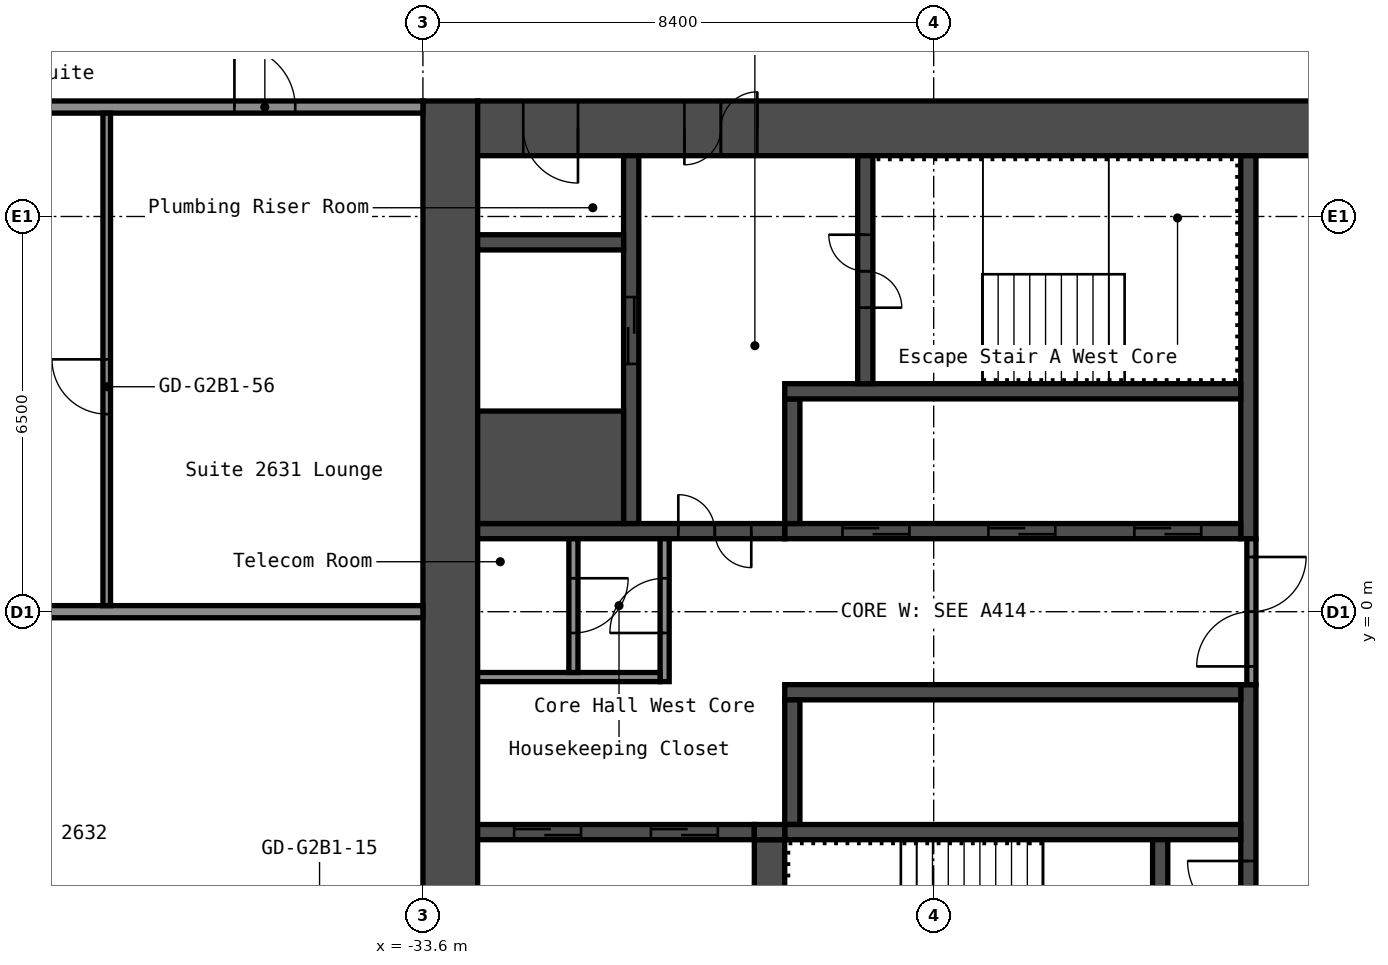
"""IFC4 building model, lengths in metres.
Left out: names, types, materials, properties, quantities, classifications, styles, units other than length and angle.
Written with IfcOpenShell. Run it as: python <this file> out.ifc"""

import sys

from ifc_helpers import new_model, si_unit, direction, frame, frame_2d, origin, place, context, subcontext, project, spatial, rectangle, extrude, element, fill, save


model = new_model("IFC4")
c1 = context("Model", 3, precision=1e-05, world=origin(), true_north=direction((0.0, 1.0)))
c2 = subcontext(c1, "Body", "Model", "MODEL_VIEW")
j1 = project(units=[si_unit("LENGTHUNIT", "METRE"), si_unit("PLANEANGLEUNIT", "RADIAN")], contexts=[c1])
p1 = place(None, origin())
s1 = spatial("IfcSite", under=j1, at=p1, CompositionType="ELEMENT")
p2 = place(p1, origin())
s2 = spatial("IfcBuilding", under=s1, at=p2, CompositionType="ELEMENT")
p3 = place(p2, frame((0.0, 0.0, 94.6)))
s3 = spatial("IfcBuildingStorey", under=s2, at=p3, CompositionType="ELEMENT", Elevation=94.6)
p4 = place(p3, frame((-33.15, -8.4, 0.0), z_axis=(0.0, 0.0, 1.0), x_axis=(0.0, 1.0, 0.0)))
e1 = element("IfcWall", 1, at=p4, inside=s3, PredefinedType="SHEAR", context=c2, shape_type="SweptSolid", body=[
    extrude(rectangle(XDim=16.8, YDim=0.9, at=frame_2d((8.4, 0.0))), origin(), (0.0, 0.0, 1.0), 2.8),
])
p5 = place(p3, frame((-32.7, 7.95, 0.0), z_axis=(0.0, 0.0, 1.0), x_axis=(1.0, 0.0, 0.0)))
e2 = element("IfcWall", 2, at=p5, inside=s3, PredefinedType="SHEAR", context=c2, shape_type="SweptSolid", body=[
    extrude(rectangle(XDim=15.0, YDim=0.9, at=frame_2d((7.5, 0.0))), origin(), (0.0, 0.0, 1.0), 2.8),
])
p6 = place(p5, frame((3.4, 0.0, 0.0)))
e3 = element("IfcOpeningElement", 3, at=p6, cuts=e2, PredefinedType="OPENING", context=c2, shape_type="SweptSolid", body=[
    extrude(rectangle(XDim=1.2, YDim=2.1, at=frame_2d((0.6, 1.05))), frame((0.0, 0.46, 0.0), z_axis=(0.0, -1.0, 0.0), x_axis=(1.0, 0.0, 0.0)), (0.0, 0.0, 1.0), 0.92),
])
p7 = place(p5, frame((0.75, 0.0, 0.0)))
e4 = element("IfcOpeningElement", 4, at=p7, cuts=e2, PredefinedType="OPENING", context=c2, shape_type="SweptSolid", body=[
    extrude(rectangle(XDim=0.9, YDim=2.1, at=frame_2d((0.45, 1.05))), frame((0.0, 0.46, 0.0), z_axis=(0.0, -1.0, 0.0), x_axis=(1.0, 0.0, 0.0)), (0.0, 0.0, 1.0), 0.92),
])
p8 = place(p3, frame((-20.025, 1.2, 0.0), z_axis=(0.0, 0.0, 1.0), x_axis=(0.0, 1.0, 0.0)))
e5 = element("IfcWall", 5, at=p8, inside=s3, PredefinedType="SHEAR", context=c2, shape_type="SweptSolid", body=[
    extrude(rectangle(XDim=6.3, YDim=0.25, at=frame_2d((3.15, 0.0))), origin(), (0.0, 0.0, 1.0), 2.8),
])
p9 = place(p3, frame((-20.025, -7.5, 0.0), z_axis=(0.0, 0.0, 1.0), x_axis=(0.0, 1.0, 0.0)))
e6 = element("IfcWall", 6, at=p9, inside=s3, PredefinedType="SHEAR", context=c2, shape_type="SweptSolid", body=[
    extrude(rectangle(XDim=6.3, YDim=0.25, at=frame_2d((3.15, 0.0))), origin(), (0.0, 0.0, 1.0), 2.8),
])
p10 = place(p9, frame((2.4, 0.0, 0.0)))
e7 = element("IfcOpeningElement", 7, at=p10, cuts=e6, PredefinedType="OPENING", context=c2, shape_type="SweptSolid", body=[
    extrude(rectangle(XDim=1.0, YDim=2.1, at=frame_2d((0.5, 1.05))), frame((0.0, 0.135, 0.0), z_axis=(0.0, -1.0, 0.0), x_axis=(1.0, 0.0, 0.0)), (0.0, 0.0, 1.0), 0.27),
])
p11 = place(p3, frame((-27.65, 1.325, 0.0), z_axis=(0.0, 0.0, 1.0), x_axis=(1.0, 0.0, 0.0)))
e8 = element("IfcWall", 8, at=p11, inside=s3, PredefinedType="SHEAR", context=c2, shape_type="SweptSolid", body=[
    extrude(rectangle(XDim=7.5, YDim=0.25, at=frame_2d((3.75, 0.0))), origin(), (0.0, 0.0, 1.0), 2.8),
])
p12 = place(p11, frame((5.75, 0.0, 0.0)))
e9 = element("IfcOpeningElement", 9, at=p12, cuts=e8, PredefinedType="OPENING", context=c2, shape_type="SweptSolid", body=[
    extrude(rectangle(XDim=1.1, YDim=2.1, at=frame_2d((0.55, 1.05))), frame((0.0, 0.135, 0.0), z_axis=(0.0, -1.0, 0.0), x_axis=(1.0, 0.0, 0.0)), (0.0, 0.0, 1.0), 0.27),
])
p13 = place(p11, frame((3.35, 0.0, 0.0)))
e10 = element("IfcOpeningElement", 10, at=p13, cuts=e8, PredefinedType="OPENING", context=c2, shape_type="SweptSolid", body=[
    extrude(rectangle(XDim=1.1, YDim=2.1, at=frame_2d((0.55, 1.05))), frame((0.0, 0.135, 0.0), z_axis=(0.0, -1.0, 0.0), x_axis=(1.0, 0.0, 0.0)), (0.0, 0.0, 1.0), 0.27),
])
p14 = place(p11, frame((0.95, 0.0, 0.0)))
e11 = element("IfcOpeningElement", 11, at=p14, cuts=e8, PredefinedType="OPENING", context=c2, shape_type="SweptSolid", body=[
    extrude(rectangle(XDim=1.1, YDim=2.1, at=frame_2d((0.55, 1.05))), frame((0.0, 0.135, 0.0), z_axis=(0.0, -1.0, 0.0), x_axis=(1.0, 0.0, 0.0)), (0.0, 0.0, 1.0), 0.27),
])
p15 = place(p3, frame((-27.525, 1.45, 0.0), z_axis=(0.0, 0.0, 1.0), x_axis=(0.0, 1.0, 0.0)))
e12 = element("IfcWall", 12, at=p15, inside=s3, PredefinedType="SHEAR", context=c2, shape_type="SweptSolid", body=[
    extrude(rectangle(XDim=2.05, YDim=0.25, at=frame_2d((1.025, 0.0))), origin(), (0.0, 0.0, 1.0), 2.8),
])
p16 = place(p3, frame((-27.65, 3.625, 0.0), z_axis=(0.0, 0.0, 1.0), x_axis=(1.0, 0.0, 0.0)))
e13 = element("IfcWall", 13, at=p16, inside=s3, PredefinedType="SHEAR", context=c2, shape_type="SweptSolid", body=[
    extrude(rectangle(XDim=7.5, YDim=0.25, at=frame_2d((3.75, 0.0))), origin(), (0.0, 0.0, 1.0), 2.8),
])
p17 = place(p3, frame((-26.325, 3.75, 0.0), z_axis=(0.0, 0.0, 1.0), x_axis=(0.0, 1.0, 0.0)))
e14 = element("IfcWall", 14, at=p17, inside=s3, PredefinedType="SHEAR", context=c2, shape_type="SweptSolid", body=[
    extrude(rectangle(XDim=3.75, YDim=0.25, at=frame_2d((1.875, 0.0))), origin(), (0.0, 0.0, 1.0), 2.8),
])
p18 = place(p17, frame((1.25, 0.0, 0.0)))
e15 = element("IfcOpeningElement", 15, at=p18, cuts=e14, PredefinedType="OPENING", context=c2, shape_type="SweptSolid", body=[
    extrude(rectangle(XDim=1.2, YDim=2.1, at=frame_2d((0.6, 1.05))), frame((0.0, 0.135, 0.0), z_axis=(0.0, -1.0, 0.0), x_axis=(1.0, 0.0, 0.0)), (0.0, 0.0, 1.0), 0.27),
])
p19 = place(p3, frame((-32.7, 1.325, 0.0), z_axis=(0.0, 0.0, 1.0), x_axis=(1.0, 0.0, 0.0)))
e16 = element("IfcWall", 16, at=p19, inside=s3, PredefinedType="SHEAR", context=c2, shape_type="SweptSolid", body=[
    extrude(rectangle(XDim=5.05, YDim=0.25, at=frame_2d((2.525, 0.0))), origin(), (0.0, 0.0, 1.0), 2.8),
])
p20 = place(p19, frame((3.3, 0.0, 0.0)))
e17 = element("IfcOpeningElement", 17, at=p20, cuts=e16, PredefinedType="OPENING", context=c2, shape_type="SweptSolid", body=[
    extrude(rectangle(XDim=1.2, YDim=2.1, at=frame_2d((0.6, 1.05))), frame((0.0, 0.135, 0.0), z_axis=(0.0, -1.0, 0.0), x_axis=(1.0, 0.0, 0.0)), (0.0, 0.0, 1.0), 0.27),
])
p21 = place(p3, frame((-30.175, 1.45, 0.0), z_axis=(0.0, 0.0, 1.0), x_axis=(0.0, 1.0, 0.0)))
e18 = element("IfcWall", 18, at=p21, inside=s3, PredefinedType="SHEAR", context=c2, shape_type="SweptSolid", body=[
    extrude(rectangle(XDim=6.05, YDim=0.25, at=frame_2d((3.025, 0.0))), origin(), (0.0, 0.0, 1.0), 2.8),
])
p22 = place(p21, frame((2.625, 0.0, 0.0)))
e19 = element("IfcOpeningElement", 19, at=p22, cuts=e18, PredefinedType="OPENING", context=c2, shape_type="SweptSolid", body=[
    extrude(rectangle(XDim=1.1, YDim=2.1, at=frame_2d((0.55, 1.05))), frame((0.0, 0.135, 0.0), z_axis=(0.0, -1.0, 0.0), x_axis=(1.0, 0.0, 0.0)), (0.0, 0.0, 1.0), 0.27),
])
p23 = place(p3, frame((-32.7, 2.375, 0.0), z_axis=(0.0, 0.0, 1.0), x_axis=(1.0, 0.0, 0.0)))
e20 = element("IfcWall", 20, at=p23, inside=s3, PredefinedType="SHEAR", context=c2, shape_type="SweptSolid", body=[
    extrude(rectangle(XDim=2.4, YDim=1.85, at=frame_2d((1.2, 0.0))), origin(), (0.0, 0.0, 1.0), 2.8),
])
p24 = place(p3, frame((-32.7, 6.075, 0.0), z_axis=(0.0, 0.0, 1.0), x_axis=(1.0, 0.0, 0.0)))
e21 = element("IfcWall", 21, at=p24, inside=s3, PredefinedType="SHEAR", context=c2, shape_type="SweptSolid", body=[
    extrude(rectangle(XDim=2.4, YDim=0.25, at=frame_2d((1.2, 0.0))), origin(), (0.0, 0.0, 1.0), 2.8),
])
p25 = place(p3, frame((-27.65, -1.325, 0.0), z_axis=(0.0, 0.0, 1.0), x_axis=(1.0, 0.0, 0.0)))
e22 = element("IfcWall", 22, at=p25, inside=s3, PredefinedType="SHEAR", context=c2, shape_type="SweptSolid", body=[
    extrude(rectangle(XDim=7.5, YDim=0.25, at=frame_2d((3.75, 0.0))), origin(), (0.0, 0.0, 1.0), 2.8),
])
p26 = place(p3, frame((-27.525, -3.5, 0.0), z_axis=(0.0, 0.0, 1.0), x_axis=(0.0, 1.0, 0.0)))
e23 = element("IfcWall", 23, at=p26, inside=s3, PredefinedType="SHEAR", context=c2, shape_type="SweptSolid", body=[
    extrude(rectangle(XDim=2.05, YDim=0.25, at=frame_2d((1.025, 0.0))), origin(), (0.0, 0.0, 1.0), 2.8),
])
p27 = place(p3, frame((-27.65, -3.625, 0.0), z_axis=(0.0, 0.0, 1.0), x_axis=(1.0, 0.0, 0.0)))
e24 = element("IfcWall", 24, at=p27, inside=s3, PredefinedType="SHEAR", context=c2, shape_type="SweptSolid", body=[
    extrude(rectangle(XDim=7.5, YDim=0.25, at=frame_2d((3.75, 0.0))), origin(), (0.0, 0.0, 1.0), 2.8),
])
p28 = place(p3, frame((-21.475, -7.5, 0.0), z_axis=(0.0, 0.0, 1.0), x_axis=(0.0, 1.0, 0.0)))
e25 = element("IfcWall", 25, at=p28, inside=s3, PredefinedType="SHEAR", context=c2, shape_type="SweptSolid", body=[
    extrude(rectangle(XDim=3.75, YDim=0.25, at=frame_2d((1.875, 0.0))), origin(), (0.0, 0.0, 1.0), 2.8),
])
p29 = place(p28, frame((1.3, 0.0, 0.0)))
e26 = element("IfcOpeningElement", 26, at=p29, cuts=e25, PredefinedType="OPENING", context=c2, shape_type="SweptSolid", body=[
    extrude(rectangle(XDim=1.2, YDim=2.1, at=frame_2d((0.6, 1.05))), frame((0.0, 0.135, 0.0), z_axis=(0.0, -1.0, 0.0), x_axis=(1.0, 0.0, 0.0)), (0.0, 0.0, 1.0), 0.27),
])
p30 = place(p3, frame((-27.9, -7.5, 0.0), z_axis=(0.0, 0.0, 1.0), x_axis=(0.0, 1.0, 0.0)))
e27 = element("IfcWall", 27, at=p30, inside=s3, PredefinedType="SHEAR", context=c2, shape_type="SweptSolid", body=[
    extrude(rectangle(XDim=3.75, YDim=0.5, at=frame_2d((1.875, 0.0))), origin(), (0.0, 0.0, 1.0), 2.8),
])
p31 = place(p3, frame((-32.7, -3.625, 0.0), z_axis=(0.0, 0.0, 1.0), x_axis=(1.0, 0.0, 0.0)))
e28 = element("IfcWall", 28, at=p31, inside=s3, PredefinedType="SHEAR", context=c2, shape_type="SweptSolid", body=[
    extrude(rectangle(XDim=4.55, YDim=0.25, at=frame_2d((2.275, 0.0))), origin(), (0.0, 0.0, 1.0), 2.8),
])
p32 = place(p31, frame((2.85, 0.0, 0.0)))
e29 = element("IfcOpeningElement", 29, at=p32, cuts=e28, PredefinedType="OPENING", context=c2, shape_type="SweptSolid", body=[
    extrude(rectangle(XDim=1.1, YDim=2.1, at=frame_2d((0.55, 1.05))), frame((0.0, 0.135, 0.0), z_axis=(0.0, -1.0, 0.0), x_axis=(1.0, 0.0, 0.0)), (0.0, 0.0, 1.0), 0.27),
])
p33 = place(p31, frame((0.6, 0.0, 0.0)))
e30 = element("IfcOpeningElement", 30, at=p33, cuts=e28, PredefinedType="OPENING", context=c2, shape_type="SweptSolid", body=[
    extrude(rectangle(XDim=1.1, YDim=2.1, at=frame_2d((0.55, 1.05))), frame((0.0, 0.135, 0.0), z_axis=(0.0, -1.0, 0.0), x_axis=(1.0, 0.0, 0.0)), (0.0, 0.0, 1.0), 0.27),
])
p34 = place(p3, frame((-28.15, -3.625, 0.0), z_axis=(0.0, 0.0, 1.0), x_axis=(1.0, 0.0, 0.0)))
e31 = element("IfcWall", 31, at=p34, inside=s3, PredefinedType="SHEAR", context=c2, shape_type="SweptSolid", body=[
    extrude(rectangle(XDim=0.5, YDim=0.25, at=frame_2d((0.25, 0.0))), origin(), (0.0, 0.0, 1.0), 2.8),
])
p35 = place(p3, frame((-19.975, -1.2, 0.0), z_axis=(0.0, 0.0, 1.0), x_axis=(0.0, 1.0, 0.0)))
e32 = element("IfcWall", 32, at=p35, inside=s3, PredefinedType="PARTITIONING", context=c2, shape_type="SweptSolid", body=[
    extrude(rectangle(XDim=2.4, YDim=0.15, at=frame_2d((1.2, 0.0))), origin(), (0.0, 0.0, 1.0), 2.8),
])
p36 = place(p35, frame((0.3, 0.0, 0.0)))
e33 = element("IfcOpeningElement", 33, at=p36, cuts=e32, PredefinedType="OPENING", context=c2, shape_type="SweptSolid", body=[
    extrude(rectangle(XDim=1.8, YDim=2.1, at=frame_2d((0.9, 1.05))), frame((0.0, 0.085, 0.0), z_axis=(0.0, -1.0, 0.0), x_axis=(1.0, 0.0, 0.0)), (0.0, 0.0, 1.0), 0.17),
])
p37 = place(p3, frame((-29.625, -1.15, 0.0), z_axis=(0.0, 0.0, 1.0), x_axis=(0.0, 1.0, 0.0)))
e34 = element("IfcWall", 34, at=p37, inside=s3, PredefinedType="PARTITIONING", context=c2, shape_type="SweptSolid", body=[
    extrude(rectangle(XDim=2.35, YDim=0.15, at=frame_2d((1.175, 0.0))), origin(), (0.0, 0.0, 1.0), 2.8),
])
p38 = place(p37, frame((0.8, 0.0, 0.0)))
e35 = element("IfcOpeningElement", 35, at=p38, cuts=e34, PredefinedType="OPENING", context=c2, shape_type="SweptSolid", body=[
    extrude(rectangle(XDim=0.9, YDim=2.1, at=frame_2d((0.45, 1.05))), frame((0.0, 0.085, 0.0), z_axis=(0.0, -1.0, 0.0), x_axis=(1.0, 0.0, 0.0)), (0.0, 0.0, 1.0), 0.17),
])
p39 = place(p3, frame((-32.7, -1.075, 0.0), z_axis=(0.0, 0.0, 1.0), x_axis=(1.0, 0.0, 0.0)))
e36 = element("IfcWall", 36, at=p39, inside=s3, PredefinedType="PARTITIONING", context=c2, shape_type="SweptSolid", body=[
    extrude(rectangle(XDim=3.0, YDim=0.15, at=frame_2d((1.5, 0.0))), origin(), (0.0, 0.0, 1.0), 2.8),
])
p40 = place(p3, frame((-31.125, -1.0, 0.0), z_axis=(0.0, 0.0, 1.0), x_axis=(0.0, 1.0, 0.0)))
e37 = element("IfcWall", 37, at=p40, inside=s3, PredefinedType="PARTITIONING", context=c2, shape_type="SweptSolid", body=[
    extrude(rectangle(XDim=2.2, YDim=0.15, at=frame_2d((1.1, 0.0))), origin(), (0.0, 0.0, 1.0), 2.8),
])
p41 = place(p40, frame((0.65, 0.0, 0.0)))
e38 = element("IfcOpeningElement", 38, at=p41, cuts=e37, PredefinedType="OPENING", context=c2, shape_type="SweptSolid", body=[
    extrude(rectangle(XDim=0.9, YDim=2.1, at=frame_2d((0.45, 1.05))), frame((0.0, 0.085, 0.0), z_axis=(0.0, -1.0, 0.0), x_axis=(1.0, 0.0, 0.0)), (0.0, 0.0, 1.0), 0.17),
])
p42 = place(p3, frame((-43.9, 0.0, 0.0), z_axis=(0.0, 0.0, 1.0), x_axis=(1.0, 0.0, 0.0)))
e39 = element("IfcWall", 39, at=p42, inside=s3, PredefinedType="PARTITIONING", context=c2, shape_type="SweptSolid", body=[
    extrude(rectangle(XDim=10.3, YDim=0.2, at=frame_2d((5.15, 0.0))), origin(), (0.0, 0.0, 1.0), 2.8),
])
p43 = place(p3, frame((-44.0, 8.3, 0.0), z_axis=(0.0, 0.0, 1.0), x_axis=(1.0, 0.0, 0.0)))
e40 = element("IfcWall", 40, at=p43, inside=s3, PredefinedType="PARTITIONING", context=c2, shape_type="SweptSolid", body=[
    extrude(rectangle(XDim=10.4, YDim=0.2, at=frame_2d((5.2, 0.0))), origin(), (0.0, 0.0, 1.0), 2.8),
])
p44 = place(p43, frame((7.3, 0.0, 0.0)))
e41 = element("IfcOpeningElement", 41, at=p44, cuts=e40, PredefinedType="OPENING", context=c2, shape_type="SweptSolid", body=[
    extrude(rectangle(XDim=1.0, YDim=2.1, at=frame_2d((0.5, 1.05))), frame((0.0, 0.11, 0.0), z_axis=(0.0, -1.0, 0.0), x_axis=(1.0, 0.0, 0.0)), (0.0, 0.0, 1.0), 0.22),
])
p45 = place(p3, frame((-38.8, 0.1, 0.0), z_axis=(0.0, 0.0, 1.0), x_axis=(0.0, 1.0, 0.0)))
e42 = element("IfcWall", 42, at=p45, inside=s3, PredefinedType="PARTITIONING", context=c2, shape_type="SweptSolid", body=[
    extrude(rectangle(XDim=8.1, YDim=0.125, at=frame_2d((4.05, 0.0))), origin(), (0.0, 0.0, 1.0), 2.8),
])
p46 = place(p45, frame((3.15, 0.0, 0.0)))
e43 = element("IfcOpeningElement", 43, at=p46, cuts=e42, PredefinedType="OPENING", context=c2, shape_type="SweptSolid", body=[
    extrude(rectangle(XDim=0.9, YDim=2.1, at=frame_2d((0.45, 1.05))), frame((0.0, 0.073, 0.0), z_axis=(0.0, -1.0, 0.0), x_axis=(1.0, 0.0, 0.0)), (0.0, 0.0, 1.0), 0.145),
])
p47 = place(p6, origin())
e44 = element("IfcDoor", 44, at=p47, inside=s3, OperationType="DOUBLE_DOOR_SINGLE_SWING", PredefinedType="DOOR", context=c2, shape_type="SweptSolid", body=[
    extrude(rectangle(XDim=1.2, YDim=2.1, at=frame_2d((0.6, 1.05))), frame((0.0, 0.025, 0.0), z_axis=(0.0, -1.0, 0.0), x_axis=(1.0, 0.0, 0.0)), (0.0, 0.0, 1.0), 0.05),
])
fill(e3, e44)
p48 = place(p7, origin())
e45 = element("IfcDoor", 45, at=p48, inside=s3, OperationType="SINGLE_SWING_RIGHT", PredefinedType="DOOR", context=c2, shape_type="SweptSolid", body=[
    extrude(rectangle(XDim=0.9, YDim=2.1, at=frame_2d((0.45, 1.05))), frame((0.0, 0.025, 0.0), z_axis=(0.0, -1.0, 0.0), x_axis=(1.0, 0.0, 0.0)), (0.0, 0.0, 1.0), 0.05),
])
fill(e4, e45)
p49 = place(p18, origin())
e46 = element("IfcDoor", 46, at=p49, inside=s3, OperationType="DOUBLE_DOOR_SINGLE_SWING", PredefinedType="DOOR", context=c2, shape_type="SweptSolid", body=[
    extrude(rectangle(XDim=1.2, YDim=2.1, at=frame_2d((0.6, 1.05))), frame((0.0, 0.025, 0.0), z_axis=(0.0, -1.0, 0.0), x_axis=(1.0, 0.0, 0.0)), (0.0, 0.0, 1.0), 0.05),
])
fill(e15, e46)
p50 = place(p10, origin())
e47 = element("IfcDoor", 47, at=p50, inside=s3, OperationType="SINGLE_SWING_LEFT", PredefinedType="DOOR", context=c2, shape_type="SweptSolid", body=[
    extrude(rectangle(XDim=1.0, YDim=2.1, at=frame_2d((0.5, 1.05))), frame((0.0, 0.025, 0.0), z_axis=(0.0, -1.0, 0.0), x_axis=(1.0, 0.0, 0.0)), (0.0, 0.0, 1.0), 0.05),
])
fill(e7, e47)
p51 = place(p20, origin())
e48 = element("IfcDoor", 48, at=p51, inside=s3, OperationType="DOUBLE_DOOR_SINGLE_SWING", PredefinedType="DOOR", context=c2, shape_type="SweptSolid", body=[
    extrude(rectangle(XDim=1.2, YDim=2.1, at=frame_2d((0.6, 1.05))), frame((0.0, 0.025, 0.0), z_axis=(0.0, -1.0, 0.0), x_axis=(1.0, 0.0, 0.0)), (0.0, 0.0, 1.0), 0.05),
])
fill(e17, e48)
p52 = place(p36, origin())
e49 = element("IfcDoor", 49, at=p52, inside=s3, OperationType="DOUBLE_DOOR_SINGLE_SWING", PredefinedType="DOOR", context=c2, shape_type="SweptSolid", body=[
    extrude(rectangle(XDim=1.8, YDim=2.1, at=frame_2d((0.9, 1.05))), frame((0.0, 0.025, 0.0), z_axis=(0.0, -1.0, 0.0), x_axis=(1.0, 0.0, 0.0)), (0.0, 0.0, 1.0), 0.05),
])
fill(e33, e49)
p53 = place(p38, origin())
e50 = element("IfcDoor", 50, at=p53, inside=s3, OperationType="SINGLE_SWING_RIGHT", PredefinedType="DOOR", context=c2, shape_type="SweptSolid", body=[
    extrude(rectangle(XDim=0.9, YDim=2.1, at=frame_2d((0.45, 1.05))), frame((0.0, 0.025, 0.0), z_axis=(0.0, -1.0, 0.0), x_axis=(1.0, 0.0, 0.0)), (0.0, 0.0, 1.0), 0.05),
])
fill(e35, e50)
p54 = place(p41, origin())
e51 = element("IfcDoor", 51, at=p54, inside=s3, OperationType="SINGLE_SWING_RIGHT", PredefinedType="DOOR", context=c2, shape_type="SweptSolid", body=[
    extrude(rectangle(XDim=0.9, YDim=2.1, at=frame_2d((0.45, 1.05))), frame((0.0, 0.025, 0.0), z_axis=(0.0, -1.0, 0.0), x_axis=(1.0, 0.0, 0.0)), (0.0, 0.0, 1.0), 0.05),
])
fill(e38, e51)
p55 = place(p12, origin())
e52 = element("IfcDoor", 52, at=p55, inside=s3, OperationType="DOUBLE_DOOR_SLIDING", PredefinedType="DOOR", context=c2, shape_type="SweptSolid", body=[
    extrude(rectangle(XDim=1.1, YDim=2.1, at=frame_2d((0.55, 1.05))), frame((0.0, 0.025, 0.0), z_axis=(0.0, -1.0, 0.0), x_axis=(1.0, 0.0, 0.0)), (0.0, 0.0, 1.0), 0.05),
])
fill(e9, e52)
p56 = place(p13, origin())
e53 = element("IfcDoor", 53, at=p56, inside=s3, OperationType="DOUBLE_DOOR_SLIDING", PredefinedType="DOOR", context=c2, shape_type="SweptSolid", body=[
    extrude(rectangle(XDim=1.1, YDim=2.1, at=frame_2d((0.55, 1.05))), frame((0.0, 0.025, 0.0), z_axis=(0.0, -1.0, 0.0), x_axis=(1.0, 0.0, 0.0)), (0.0, 0.0, 1.0), 0.05),
])
fill(e10, e53)
p57 = place(p14, origin())
e54 = element("IfcDoor", 54, at=p57, inside=s3, OperationType="DOUBLE_DOOR_SLIDING", PredefinedType="DOOR", context=c2, shape_type="SweptSolid", body=[
    extrude(rectangle(XDim=1.1, YDim=2.1, at=frame_2d((0.55, 1.05))), frame((0.0, 0.025, 0.0), z_axis=(0.0, -1.0, 0.0), x_axis=(1.0, 0.0, 0.0)), (0.0, 0.0, 1.0), 0.05),
])
fill(e11, e54)
p58 = place(p22, origin())
e55 = element("IfcDoor", 55, at=p58, inside=s3, OperationType="DOUBLE_DOOR_SLIDING", PredefinedType="DOOR", context=c2, shape_type="SweptSolid", body=[
    extrude(rectangle(XDim=1.1, YDim=2.1, at=frame_2d((0.55, 1.05))), frame((0.0, 0.025, 0.0), z_axis=(0.0, -1.0, 0.0), x_axis=(1.0, 0.0, 0.0)), (0.0, 0.0, 1.0), 0.05),
])
fill(e19, e55)
p59 = place(p32, origin())
e56 = element("IfcDoor", 56, at=p59, inside=s3, OperationType="DOUBLE_DOOR_SLIDING", PredefinedType="DOOR", context=c2, shape_type="SweptSolid", body=[
    extrude(rectangle(XDim=1.1, YDim=2.1, at=frame_2d((0.55, 1.05))), frame((0.0, 0.025, 0.0), z_axis=(0.0, -1.0, 0.0), x_axis=(1.0, 0.0, 0.0)), (0.0, 0.0, 1.0), 0.05),
])
fill(e29, e56)
p60 = place(p33, origin())
e57 = element("IfcDoor", 57, at=p60, inside=s3, OperationType="DOUBLE_DOOR_SLIDING", PredefinedType="DOOR", context=c2, shape_type="SweptSolid", body=[
    extrude(rectangle(XDim=1.1, YDim=2.1, at=frame_2d((0.55, 1.05))), frame((0.0, 0.025, 0.0), z_axis=(0.0, -1.0, 0.0), x_axis=(1.0, 0.0, 0.0)), (0.0, 0.0, 1.0), 0.05),
])
fill(e30, e57)
p61 = place(p44, origin())
e58 = element("IfcDoor", 58, at=p61, inside=s3, OperationType="SINGLE_SWING_RIGHT", PredefinedType="DOOR", context=c2, shape_type="SweptSolid", body=[
    extrude(rectangle(XDim=1.0, YDim=2.1, at=frame_2d((0.5, 1.05))), frame((0.0, 0.025, 0.0), z_axis=(0.0, -1.0, 0.0), x_axis=(1.0, 0.0, 0.0)), (0.0, 0.0, 1.0), 0.05),
])
fill(e41, e58)
p62 = place(p46, origin())
e59 = element("IfcDoor", 59, at=p62, inside=s3, OperationType="SINGLE_SWING_LEFT", PredefinedType="DOOR", context=c2, shape_type="SweptSolid", body=[
    extrude(rectangle(XDim=0.9, YDim=2.1, at=frame_2d((0.45, 1.05))), frame((0.0, 0.025, 0.0), z_axis=(0.0, -1.0, 0.0), x_axis=(1.0, 0.0, 0.0)), (0.0, 0.0, 1.0), 0.05),
])
fill(e43, e59)
save(model, sys.argv[1])
